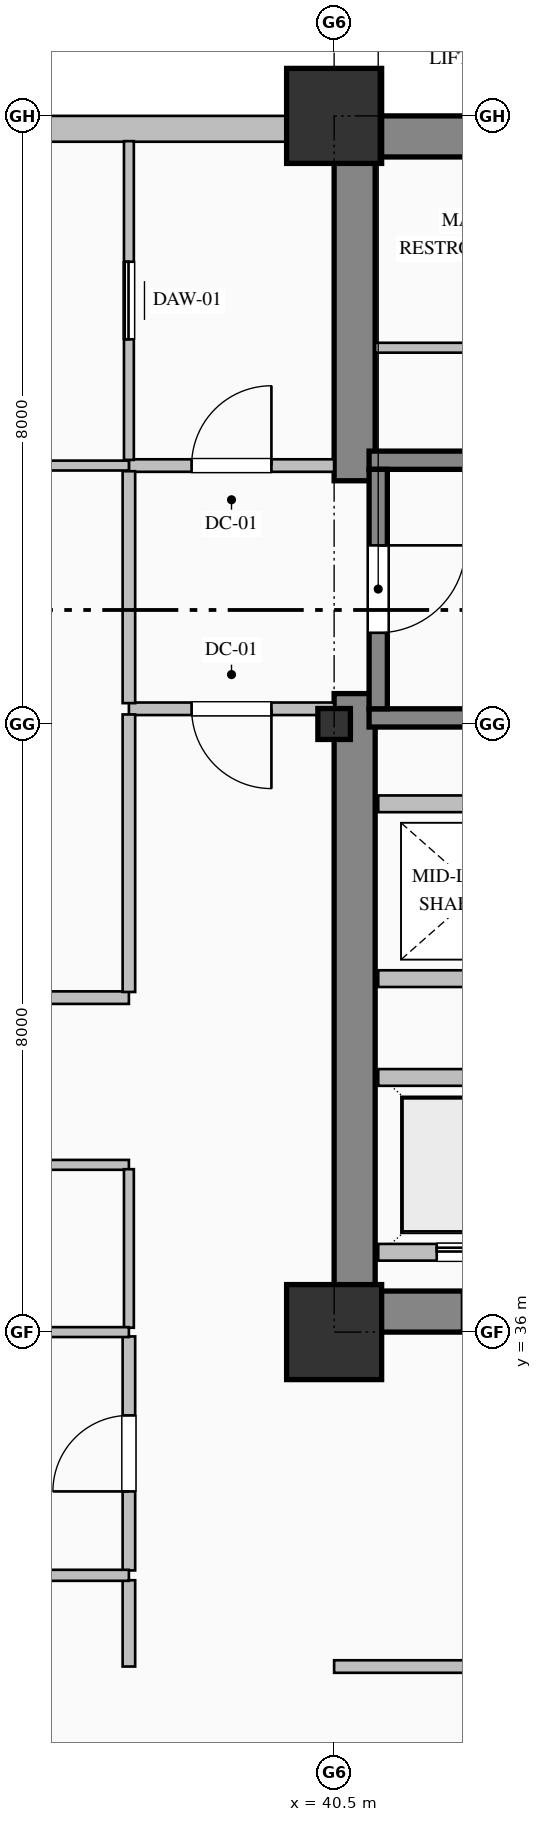
"""IFC4 building model, lengths in metres.
Left out: names, types, materials, properties, quantities, classifications, styles, units other than length and angle.
Written with IfcOpenShell. Run it as: python <this file> out.ifc"""

import sys

from ifc_helpers import new_model, si_unit, direction, frame, frame_2d, origin, origin_2d, place, context, subcontext, project, spatial, rectangle, hollow_rectangle, i_section, extrude, element, fill, save


model = new_model("IFC4")
c1 = context("Model", 3, precision=1e-05, world=origin(), true_north=direction((0.0, 1.0)))
c2 = subcontext(c1, "Body", "Model", "MODEL_VIEW")
j1 = project(units=[si_unit("LENGTHUNIT", "METRE"), si_unit("PLANEANGLEUNIT", "RADIAN")], contexts=[c1])
p1 = place(None, origin())
s1 = spatial("IfcSite", under=j1, at=p1, CompositionType="ELEMENT")
p2 = place(p1, origin())
s2 = spatial("IfcBuilding", under=s1, at=p2, CompositionType="ELEMENT")
p3 = place(p2, frame((0.0, 0.0, 52.2)))
s3 = spatial("IfcBuildingStorey", under=s2, at=p3, CompositionType="ELEMENT", Elevation=52.2)
p4 = place(p3, frame((40.5, 51.73, 0.0), z_axis=(0.0, 0.0, 1.0), x_axis=(1.0, 0.0, 0.0)))
e1 = element("IfcWall", 1, at=p4, inside=s3, PredefinedType="SHEAR", context=c2, shape_type="SweptSolid", body=[
    extrude(rectangle(XDim=23.5, YDim=0.54, at=frame_2d((11.75, 0.0))), origin(), (0.0, 0.0, 1.0), 3.75),
])
p5 = place(p3, frame((40.77, 36.54, 0.0), z_axis=(0.0, 0.0, 1.0), x_axis=(0.0, 1.0, 0.0)))
e2 = element("IfcWall", 2, at=p5, inside=s3, PredefinedType="SHEAR", context=c2, shape_type="SweptSolid", body=[
    extrude(rectangle(XDim=7.86, YDim=0.54, at=frame_2d((3.93, 0.0))), origin(), (0.0, 0.0, 1.0), 3.75),
])
p6 = place(p3, frame((40.77, 47.2, 0.0), z_axis=(0.0, 0.0, 1.0), x_axis=(0.0, 1.0, 0.0)))
e3 = element("IfcWall", 3, at=p6, inside=s3, PredefinedType="SHEAR", context=c2, shape_type="SweptSolid", body=[
    extrude(rectangle(XDim=4.26, YDim=0.54, at=frame_2d((2.13, 0.0))), origin(), (0.0, 0.0, 1.0), 3.75),
])
p7 = place(p3, frame((40.5, 36.27, 0.0), z_axis=(0.0, 0.0, 1.0), x_axis=(1.0, 0.0, 0.0)))
e4 = element("IfcWall", 4, at=p7, inside=s3, PredefinedType="SHEAR", context=c2, shape_type="SweptSolid", body=[
    extrude(rectangle(XDim=1.7, YDim=0.54, at=frame_2d((0.85, 0.0))), origin(), (0.0, 0.0, 1.0), 3.75),
])
p8 = place(p3, frame((40.5, 36.0, 0.0), z_axis=(0.0, 0.0, 1.0), x_axis=(1.0, 0.0, 0.0)))
e5 = element("IfcColumn", 5, at=p8, inside=s3, PredefinedType="COLUMN", context=c2, shape_type="SweptSolid", body=[
    extrude(hollow_rectangle(XDim=1.25, YDim=1.25, WallThickness=0.045, at=origin_2d()), origin(), (0.0, 0.0, 1.0), 4.0),
])
p9 = place(p3, frame((40.5, 44.0, 0.0), z_axis=(0.0, 0.0, 1.0), x_axis=(1.0, 0.0, 0.0)))
e6 = element("IfcColumn", 6, at=p9, inside=s3, PredefinedType="COLUMN", context=c2, shape_type="SweptSolid", body=[
    extrude(i_section(OverallWidth=0.407, OverallDepth=0.428, WebThickness=0.02, FlangeThickness=0.035, FilletRadius=0.022, at=origin_2d()), origin(), (0.0, 0.0, 1.0), 4.0),
])
p10 = place(p3, frame((40.5, 52.0, 0.0), z_axis=(0.0, 0.0, 1.0), x_axis=(1.0, 0.0, 0.0)))
e7 = element("IfcColumn", 7, at=p10, inside=s3, PredefinedType="COLUMN", context=c2, shape_type="SweptSolid", body=[
    extrude(hollow_rectangle(XDim=1.25, YDim=1.25, WallThickness=0.045, at=origin_2d()), origin(), (0.0, 0.0, 1.0), 4.0),
])
p11 = place(p3, frame((4.0, 51.83, 0.0), z_axis=(0.0, 0.0, 1.0), x_axis=(1.0, 0.0, 0.0)))
e8 = element("IfcWall", 8, at=p11, inside=s3, PredefinedType="SOLIDWALL", context=c2, shape_type="SweptSolid", body=[
    extrude(rectangle(XDim=36.52, YDim=0.34, at=frame_2d((18.26, 0.0))), origin(), (0.0, 0.0, 1.0), 3.25),
])
p12 = place(p11, frame((6.3, 0.0, 0.85)))
e9 = element("IfcOpeningElement", 9, at=p12, cuts=e8, PredefinedType="OPENING", context=c2, shape_type="SweptSolid", body=[
    extrude(rectangle(XDim=1.8, YDim=2.05, at=frame_2d((0.9, 1.025))), frame((0.0, 0.18, 0.0), z_axis=(0.0, -1.0, 0.0), x_axis=(1.0, 0.0, 0.0)), (0.0, 0.0, 1.0), 0.36),
])
p13 = place(p11, frame((17.1, 0.0, 0.85)))
e10 = element("IfcOpeningElement", 10, at=p13, cuts=e8, PredefinedType="OPENING", context=c2, shape_type="SweptSolid", body=[
    extrude(rectangle(XDim=1.8, YDim=2.05, at=frame_2d((0.9, 1.025))), frame((0.0, 0.18, 0.0), z_axis=(0.0, -1.0, 0.0), x_axis=(1.0, 0.0, 0.0)), (0.0, 0.0, 1.0), 0.36),
])
p14 = place(p11, frame((24.0, 0.0, 0.8)))
e11 = element("IfcOpeningElement", 11, at=p14, cuts=e8, PredefinedType="OPENING", context=c2, shape_type="SweptSolid", body=[
    extrude(rectangle(XDim=2.4, YDim=2.15, at=frame_2d((1.2, 1.075))), frame((0.0, 0.18, 0.0), z_axis=(0.0, -1.0, 0.0), x_axis=(1.0, 0.0, 0.0)), (0.0, 0.0, 1.0), 0.36),
])
for number, where, z_axis, x_axis in (
    (12, (40.96, 47.47, 0.0), (0.0, 0.0, 1.0), (1.0, 0.0, 0.0)),
    (13, (49.04, 44.08, 0.0), (0.0, 0.0, 1.0), (-1.0, 0.0, 0.0)),
):
    element("IfcWall", number, at=place(p3, frame(where, z_axis=z_axis, x_axis=x_axis)), inside=s3, PredefinedType="SOLIDWALL", context=c2, shape_type="SweptSolid", body=[
        extrude(rectangle(XDim=8.08, YDim=0.24, at=frame_2d((4.04, 0.0))), origin(), (0.0, 0.0, 1.0), 4.0),
    ])
p15 = place(p3, frame((41.08, 47.35, 0.0), z_axis=(0.0, 0.0, 1.0), x_axis=(0.0, -1.0, 0.0)))
e14 = element("IfcWall", 14, at=p15, inside=s3, PredefinedType="SOLIDWALL", context=c2, shape_type="SweptSolid", body=[
    extrude(rectangle(XDim=3.15, YDim=0.24, at=frame_2d((1.575, 0.0))), origin(), (0.0, 0.0, 1.0), 4.0),
])
p16 = place(p15, frame((1.0, 0.0, 0.0)))
e15 = element("IfcOpeningElement", 15, at=p16, cuts=e14, PredefinedType="OPENING", context=c2, shape_type="SweptSolid", body=[
    extrude(rectangle(XDim=1.15, YDim=2.2, at=frame_2d((0.575, 1.1))), frame((0.0, 0.13, 0.0), z_axis=(0.0, -1.0, 0.0), x_axis=(1.0, 0.0, 0.0)), (0.0, 0.0, 1.0), 0.26),
])
p17 = place(p3, frame((49.32, 37.05, 0.0), z_axis=(0.0, 0.0, 1.0), x_axis=(-1.0, 0.0, 0.0)))
e16 = element("IfcWall", 16, at=p17, inside=s3, PredefinedType="PARTITIONING", context=c2, shape_type="SweptSolid", body=[
    extrude(rectangle(XDim=8.24, YDim=0.22, at=frame_2d((4.12, 0.0))), origin(), (0.0, 0.0, 1.0), 3.75),
])
p18 = place(p17, frame((6.37, 0.0, 0.0)))
e17 = element("IfcOpeningElement", 17, at=p18, cuts=e16, PredefinedType="OPENING", context=c2, shape_type="SweptSolid", body=[
    extrude(rectangle(XDim=1.1, YDim=2.2, at=frame_2d((0.55, 1.1))), frame((0.0, 0.12, 0.0), z_axis=(0.0, -1.0, 0.0), x_axis=(1.0, 0.0, 0.0)), (0.0, 0.0, 1.0), 0.24),
])
p19 = place(p17, frame((3.57, 0.0, 0.0)))
e18 = element("IfcOpeningElement", 18, at=p19, cuts=e16, PredefinedType="OPENING", context=c2, shape_type="SweptSolid", body=[
    extrude(rectangle(XDim=1.1, YDim=2.2, at=frame_2d((0.55, 1.1))), frame((0.0, 0.12, 0.0), z_axis=(0.0, -1.0, 0.0), x_axis=(1.0, 0.0, 0.0)), (0.0, 0.0, 1.0), 0.24),
])
p20 = place(p17, frame((0.77, 0.0, 0.0)))
e19 = element("IfcOpeningElement", 19, at=p20, cuts=e16, PredefinedType="OPENING", context=c2, shape_type="SweptSolid", body=[
    extrude(rectangle(XDim=1.1, YDim=2.2, at=frame_2d((0.55, 1.1))), frame((0.0, 0.12, 0.0), z_axis=(0.0, -1.0, 0.0), x_axis=(1.0, 0.0, 0.0)), (0.0, 0.0, 1.0), 0.24),
])
for number, where, z_axis, x_axis in (
    (20, (41.08, 39.35, 0.0), (0.0, 0.0, 1.0), (1.0, 0.0, 0.0)),
    (21, (49.32, 40.65, 0.0), (0.0, 0.0, 1.0), (-1.0, 0.0, 0.0)),
    (22, (41.08, 42.95, 0.0), (0.0, 0.0, 1.0), (1.0, 0.0, 0.0)),
):
    element("IfcWall", number, at=place(p3, frame(where, z_axis=z_axis, x_axis=x_axis)), inside=s3, PredefinedType="PARTITIONING", context=c2, shape_type="SweptSolid", body=[
        extrude(rectangle(XDim=8.24, YDim=0.22, at=frame_2d((4.12, 0.0))), origin(), (0.0, 0.0, 1.0), 3.75),
    ])
p21 = place(p3, frame((37.8, 47.4, 0.0), z_axis=(0.0, 0.0, 1.0), x_axis=(1.0, 0.0, 0.0)))
e23 = element("IfcWall", 23, at=p21, inside=s3, PredefinedType="PARTITIONING", context=c2, shape_type="SweptSolid", body=[
    extrude(rectangle(XDim=2.7, YDim=0.165, at=frame_2d((1.35, 0.0))), origin(), (0.0, 0.0, 1.0), 3.75),
])
p22 = place(p21, frame((0.825, 0.0, 0.0)))
e24 = element("IfcOpeningElement", 24, at=p22, cuts=e23, PredefinedType="OPENING", context=c2, shape_type="SweptSolid", body=[
    extrude(rectangle(XDim=1.05, YDim=2.15, at=frame_2d((0.525, 1.075))), frame((0.0, 0.093, 0.0), z_axis=(0.0, -1.0, 0.0), x_axis=(1.0, 0.0, 0.0)), (0.0, 0.0, 1.0), 0.185),
])
p23 = place(p3, frame((40.5, 44.2, 0.0), z_axis=(0.0, 0.0, 1.0), x_axis=(-1.0, 0.0, 0.0)))
e25 = element("IfcWall", 25, at=p23, inside=s3, PredefinedType="PARTITIONING", context=c2, shape_type="SweptSolid", body=[
    extrude(rectangle(XDim=2.7, YDim=0.165, at=frame_2d((1.35, 0.0))), origin(), (0.0, 0.0, 1.0), 3.75),
])
p24 = place(p23, frame((0.825, 0.0, 0.0)))
e26 = element("IfcOpeningElement", 26, at=p24, cuts=e25, PredefinedType="OPENING", context=c2, shape_type="SweptSolid", body=[
    extrude(rectangle(XDim=1.05, YDim=2.15, at=frame_2d((0.525, 1.075))), frame((0.0, 0.093, 0.0), z_axis=(0.0, -1.0, 0.0), x_axis=(1.0, 0.0, 0.0)), (0.0, 0.0, 1.0), 0.185),
])
p25 = place(p3, frame((37.8, 44.274, 0.0), z_axis=(0.0, 0.0, 1.0), x_axis=(0.0, 1.0, 0.0)))
e27 = element("IfcWall", 27, at=p25, inside=s3, PredefinedType="PARTITIONING", context=c2, shape_type="SweptSolid", body=[
    extrude(rectangle(XDim=3.051, YDim=0.165, at=frame_2d((1.525, 0.0))), origin(), (0.0, 0.0, 1.0), 3.75),
])
p26 = place(p3, frame((37.8, 47.475, 0.0), z_axis=(0.0, 0.0, 1.0), x_axis=(0.0, 1.0, 0.0)))
e28 = element("IfcWall", 28, at=p26, inside=s3, PredefinedType="PARTITIONING", context=c2, shape_type="SweptSolid", body=[
    extrude(rectangle(XDim=4.193, YDim=0.13, at=frame_2d((2.097, 0.0))), origin(), (0.0, 0.0, 1.0), 3.75),
])
p27 = place(p26, frame((1.587, 0.0, 0.0)))
e29 = element("IfcOpeningElement", 29, at=p27, cuts=e28, PredefinedType="OPENING", context=c2, shape_type="SweptSolid", body=[
    extrude(rectangle(XDim=1.02, YDim=2.15, at=frame_2d((0.51, 1.075))), frame((0.0, 0.075, 0.0), z_axis=(0.0, -1.0, 0.0), x_axis=(1.0, 0.0, 0.0)), (0.0, 0.0, 1.0), 0.15),
])
p28 = place(p3, frame((37.8, 47.4, 0.0), z_axis=(0.0, 0.0, 1.0), x_axis=(-1.0, 0.0, 0.0)))
e30 = element("IfcWall", 30, at=p28, inside=s3, PredefinedType="PARTITIONING", context=c2, shape_type="SweptSolid", body=[
    extrude(rectangle(XDim=2.4, YDim=0.13, at=frame_2d((1.2, 0.0))), origin(), (0.0, 0.0, 1.0), 3.75),
])
p29 = place(p3, frame((41.04, 48.95, 0.0), z_axis=(0.0, 0.0, 1.0), x_axis=(1.0, 0.0, 0.0)))
e31 = element("IfcWall", 31, at=p29, inside=s3, PredefinedType="PARTITIONING", context=c2, shape_type="SweptSolid", body=[
    extrude(rectangle(XDim=4.16, YDim=0.13, at=frame_2d((2.08, 0.0))), origin(), (0.0, 0.0, 1.0), 3.75),
])
p30 = place(p29, frame((1.62, 0.0, 0.0)))
e32 = element("IfcOpeningElement", 32, at=p30, cuts=e31, PredefinedType="OPENING", context=c2, shape_type="SweptSolid", body=[
    extrude(rectangle(XDim=0.92, YDim=2.15, at=frame_2d((0.46, 1.075))), frame((0.0, 0.075, 0.0), z_axis=(0.0, -1.0, 0.0), x_axis=(1.0, 0.0, 0.0)), (0.0, 0.0, 1.0), 0.15),
])
p31 = place(p3, frame((32.5, 40.4, 0.0), z_axis=(0.0, 0.0, 1.0), x_axis=(1.0, 0.0, 0.0)))
e33 = element("IfcWall", 33, at=p31, inside=s3, PredefinedType="PARTITIONING", context=c2, shape_type="SweptSolid", body=[
    extrude(rectangle(XDim=5.3, YDim=0.165, at=frame_2d((2.65, 0.0))), origin(), (0.0, 0.0, 1.0), 3.75),
])
p32 = place(p31, frame((2.1, 0.0, 0.0)))
e34 = element("IfcOpeningElement", 34, at=p32, cuts=e33, PredefinedType="OPENING", context=c2, shape_type="SweptSolid", body=[
    extrude(rectangle(XDim=1.1, YDim=2.2, at=frame_2d((0.55, 1.1))), frame((0.0, 0.093, 0.0), z_axis=(0.0, -1.0, 0.0), x_axis=(1.0, 0.0, 0.0)), (0.0, 0.0, 1.0), 0.185),
])
p33 = place(p3, frame((37.8, 38.2, 0.0), z_axis=(0.0, 0.0, 1.0), x_axis=(-1.0, 0.0, 0.0)))
e35 = element("IfcWall", 35, at=p33, inside=s3, PredefinedType="PARTITIONING", context=c2, shape_type="SweptSolid", body=[
    extrude(rectangle(XDim=28.8, YDim=0.13, at=frame_2d((14.4, 0.0))), origin(), (0.0, 0.0, 1.0), 3.75),
])
p34 = place(p33, frame((13.9, 0.0, 0.0)))
e36 = element("IfcOpeningElement", 36, at=p34, cuts=e35, PredefinedType="OPENING", context=c2, shape_type="SweptSolid", body=[
    extrude(rectangle(XDim=1.0, YDim=2.15, at=frame_2d((0.5, 1.075))), frame((0.0, 0.075, 0.0), z_axis=(0.0, -1.0, 0.0), x_axis=(1.0, 0.0, 0.0)), (0.0, 0.0, 1.0), 0.15),
])
p35 = place(p3, frame((37.8, 40.475, 0.0), z_axis=(0.0, 0.0, 1.0), x_axis=(0.0, 1.0, 0.0)))
e37 = element("IfcWall", 37, at=p35, inside=s3, PredefinedType="PARTITIONING", context=c2, shape_type="SweptSolid", body=[
    extrude(rectangle(XDim=3.651, YDim=0.165, at=frame_2d((1.825, 0.0))), origin(), (0.0, 0.0, 1.0), 3.75),
])
p36 = place(p3, frame((37.8, 31.6, 0.0), z_axis=(0.0, 0.0, 1.0), x_axis=(0.0, 1.0, 0.0)))
e38 = element("IfcWall", 38, at=p36, inside=s3, PredefinedType="PARTITIONING", context=c2, shape_type="SweptSolid", body=[
    extrude(rectangle(XDim=1.135, YDim=0.165, at=frame_2d((0.568, 0.0))), origin(), (0.0, 0.0, 1.0), 3.75),
])
p37 = place(p3, frame((37.8, 32.865, 0.0), z_axis=(0.0, 0.0, 1.0), x_axis=(0.0, 1.0, 0.0)))
e39 = element("IfcWall", 39, at=p37, inside=s3, PredefinedType="PARTITIONING", context=c2, shape_type="SweptSolid", body=[
    extrude(rectangle(XDim=3.079, YDim=0.165, at=frame_2d((1.539, 0.0))), origin(), (0.0, 0.0, 1.0), 3.75),
])
p38 = place(p37, frame((1.039, 0.0, 0.0)))
e40 = element("IfcOpeningElement", 40, at=p38, cuts=e39, PredefinedType="OPENING", context=c2, shape_type="SweptSolid", body=[
    extrude(rectangle(XDim=1.0, YDim=2.15, at=frame_2d((0.5, 1.075))), frame((0.0, 0.093, 0.0), z_axis=(0.0, -1.0, 0.0), x_axis=(1.0, 0.0, 0.0)), (0.0, 0.0, 1.0), 0.185),
])
p39 = place(p3, frame((37.8, 36.057, 0.0), z_axis=(0.0, 0.0, 1.0), x_axis=(0.0, 1.0, 0.0)))
e41 = element("IfcWall", 41, at=p39, inside=s3, PredefinedType="PARTITIONING", context=c2, shape_type="SweptSolid", body=[
    extrude(rectangle(XDim=2.086, YDim=0.13, at=frame_2d((1.043, 0.0))), origin(), (0.0, 0.0, 1.0), 3.75),
])
p40 = place(p3, frame((43.0, 31.6, 0.0), z_axis=(0.0, 0.0, 1.0), x_axis=(-1.0, 0.0, 0.0)))
e42 = element("IfcWall", 42, at=p40, inside=s3, PredefinedType="PARTITIONING", context=c2, shape_type="SweptSolid", body=[
    extrude(rectangle(XDim=2.5, YDim=0.165, at=frame_2d((1.25, 0.0))), origin(), (0.0, 0.0, 1.0), 3.75),
])
p41 = place(p3, frame((0.332, 32.8, 0.0), z_axis=(0.0, 0.0, 1.0), x_axis=(1.0, 0.0, 0.0)))
e43 = element("IfcWall", 43, at=p41, inside=s3, PredefinedType="PARTITIONING", context=c2, shape_type="SweptSolid", body=[
    extrude(rectangle(XDim=37.468, YDim=0.145, at=frame_2d((18.734, 0.0))), origin(), (0.0, 0.0, 1.0), 3.75),
])
p42 = place(p41, frame((18.234, 0.0, 0.0)))
e44 = element("IfcOpeningElement", 44, at=p42, cuts=e43, PredefinedType="OPENING", context=c2, shape_type="SweptSolid", body=[
    extrude(rectangle(XDim=1.0, YDim=2.15, at=frame_2d((0.5, 1.075))), frame((0.0, 0.083, 0.0), z_axis=(0.0, -1.0, 0.0), x_axis=(1.0, 0.0, 0.0)), (0.0, 0.0, 1.0), 0.165),
])
p43 = place(p3, frame((0.332, 36.0, 0.0), z_axis=(0.0, 0.0, 1.0), x_axis=(1.0, 0.0, 0.0)))
e45 = element("IfcWall", 45, at=p43, inside=s3, PredefinedType="PARTITIONING", context=c2, shape_type="SweptSolid", body=[
    extrude(rectangle(XDim=37.468, YDim=0.13, at=frame_2d((18.734, 0.0))), origin(), (0.0, 0.0, 1.0), 3.042),
])
p44 = place(p16, origin())
e46 = element("IfcDoor", 46, at=p44, inside=s3, OperationType="SINGLE_SWING_LEFT", PredefinedType="DOOR", context=c2, shape_type="SweptSolid", body=[
    extrude(rectangle(XDim=1.15, YDim=2.2, at=frame_2d((0.575, 1.1))), frame((0.0, 0.025, 0.0), z_axis=(0.0, -1.0, 0.0), x_axis=(1.0, 0.0, 0.0)), (0.0, 0.0, 1.0), 0.05),
])
fill(e15, e46)
p45 = place(p18, origin())
e47 = element("IfcDoor", 47, at=p45, inside=s3, OperationType="DOUBLE_DOOR_SLIDING", PredefinedType="DOOR", context=c2, shape_type="SweptSolid", body=[
    extrude(rectangle(XDim=1.1, YDim=2.2, at=frame_2d((0.55, 1.1))), frame((0.0, 0.025, 0.0), z_axis=(0.0, -1.0, 0.0), x_axis=(1.0, 0.0, 0.0)), (0.0, 0.0, 1.0), 0.05),
])
fill(e17, e47)
p46 = place(p22, origin())
e48 = element("IfcDoor", 48, at=p46, inside=s3, OperationType="SINGLE_SWING_RIGHT", PredefinedType="DOOR", context=c2, shape_type="SweptSolid", body=[
    extrude(rectangle(XDim=1.05, YDim=2.15, at=frame_2d((0.525, 1.075))), frame((0.0, 0.025, 0.0), z_axis=(0.0, -1.0, 0.0), x_axis=(1.0, 0.0, 0.0)), (0.0, 0.0, 1.0), 0.05),
])
fill(e24, e48)
p47 = place(p24, origin())
e49 = element("IfcDoor", 49, at=p47, inside=s3, OperationType="SINGLE_SWING_LEFT", PredefinedType="DOOR", context=c2, shape_type="SweptSolid", body=[
    extrude(rectangle(XDim=1.05, YDim=2.15, at=frame_2d((0.525, 1.075))), frame((0.0, 0.025, 0.0), z_axis=(0.0, -1.0, 0.0), x_axis=(1.0, 0.0, 0.0)), (0.0, 0.0, 1.0), 0.05),
])
fill(e26, e49)
p48 = place(p27, origin())
e50 = element("IfcDoor", 50, at=p48, inside=s3, OperationType="SLIDING_TO_LEFT", PredefinedType="DOOR", context=c2, shape_type="SweptSolid", body=[
    extrude(rectangle(XDim=1.02, YDim=2.15, at=frame_2d((0.51, 1.075))), frame((0.0, 0.025, 0.0), z_axis=(0.0, -1.0, 0.0), x_axis=(1.0, 0.0, 0.0)), (0.0, 0.0, 1.0), 0.05),
])
fill(e29, e50)
p49 = place(p38, origin())
e51 = element("IfcDoor", 51, at=p49, inside=s3, OperationType="SINGLE_SWING_LEFT", PredefinedType="DOOR", context=c2, shape_type="SweptSolid", body=[
    extrude(rectangle(XDim=1.0, YDim=2.15, at=frame_2d((0.5, 1.075))), frame((0.0, 0.025, 0.0), z_axis=(0.0, -1.0, 0.0), x_axis=(1.0, 0.0, 0.0)), (0.0, 0.0, 1.0), 0.05),
])
fill(e40, e51)
save(model, sys.argv[1])
